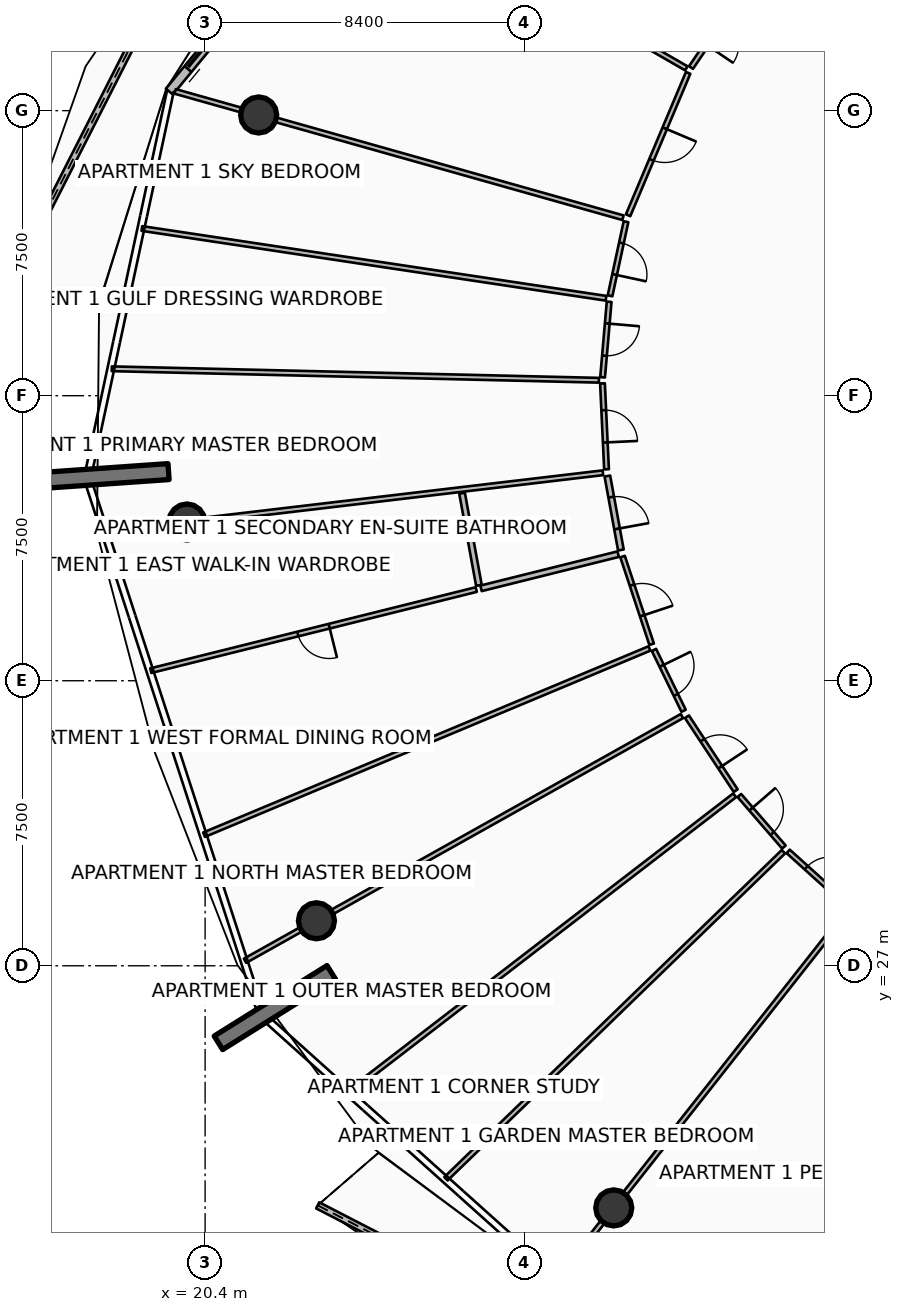
"""IFC4 building model, lengths in metres.
Left out: names, types, materials, properties, quantities, classifications, styles, units other than length and angle.
Written with IfcOpenShell. Run it as: python <this file> out.ifc"""

import sys

from ifc_helpers import new_model, si_unit, direction, frame, frame_2d, origin, origin_2d, place, context, subcontext, project, spatial, polyline, rectangle, circle, outline, extrude, element, fill, save


model = new_model("IFC4")
c1 = context("Model", 3, precision=1e-05, world=origin(), true_north=direction((0.0, 1.0)))
c2 = subcontext(c1, "Body", "Model", "MODEL_VIEW")
j1 = project(units=[si_unit("LENGTHUNIT", "METRE"), si_unit("PLANEANGLEUNIT", "RADIAN")], contexts=[c1])
p1 = place(None, origin())
s1 = spatial("IfcSite", under=j1, at=p1, CompositionType="ELEMENT")
p2 = place(p1, origin())
s2 = spatial("IfcBuilding", under=s1, at=p2, CompositionType="ELEMENT")
p3 = place(p2, frame((0.0, 0.0, 286.75)))
s3 = spatial("IfcBuildingStorey", under=s2, at=p3, CompositionType="ELEMENT", Elevation=286.75)
p4 = place(p3, frame((19.438, 40.003, 0.0), z_axis=(0.0, 0.0, 1.0), x_axis=(-0.997563824095, -0.069759707979, 0.0)))
e1 = element("IfcWall", 1, at=p4, inside=s3, PredefinedType="SOLIDWALL", context=c2, shape_type="SweptSolid", body=[
    extrude(rectangle(XDim=3.5, YDim=0.42, at=frame_2d((1.75, 0.0))), origin(), (0.0, 0.0, 1.0), 3.85),
])
p5 = place(p3, frame((23.719, 26.827, 0.0), z_axis=(0.0, 0.0, 1.0), x_axis=(-0.848033572426, -0.529942506352, 0.0)))
e2 = element("IfcWall", 2, at=p5, inside=s3, PredefinedType="SOLIDWALL", context=c2, shape_type="SweptSolid", body=[
    extrude(rectangle(XDim=3.5, YDim=0.42, at=frame_2d((1.75, 0.0))), origin(), (0.0, 0.0, 1.0), 3.85),
])
for number, where, z_axis, x_axis in (
    (3, (21.809, 49.387, 0.0), (0.0, 0.0, 1.0), (1.0, 0.0, 0.0)),
    (4, (19.92, 38.677, 0.0), (0.0, 0.0, 1.0), (1.0, 0.0, 0.0)),
    (5, (23.33, 28.184, 0.0), (0.0, 0.0, 1.0), (1.0, 0.0, 0.0)),
    (6, (31.153, 20.629, 0.0), (0.0, 0.0, 1.0), (1.0, 0.0, 0.0)),
):
    element("IfcColumn", number, at=place(p3, frame(where, z_axis=z_axis, x_axis=x_axis)), inside=s3, PredefinedType="COLUMN", context=c2, shape_type="SweptSolid", body=[
        extrude(circle(Radius=0.475, at=origin_2d()), origin(), (0.0, 0.0, 1.0), 3.59),
    ])
p6 = place(p3, frame((20.758, 55.746, 0.0), z_axis=(0.0, 0.0, 1.0), x_axis=(-0.45375182612, -0.891128094211, 0.0)))
e7 = element("IfcWall", 7, at=p6, inside=s3, PredefinedType="PARAPET", context=c2, shape_type="SweptSolid", body=[
    extrude(outline(polyline([(0.0, 0.0), (12.3, 0.0), (12.3, 1.747), (6.15, 1.562), (0.0, 1.348), (0.0, 0.0)])), frame((0.0, 0.09, 0.0), z_axis=(0.0, -1.0, 0.0), x_axis=(1.0, 0.0, 0.0)), (0.0, 0.0, 1.0), 0.18),
])
p7 = place(p3, frame((23.363, 20.696, 0.0), z_axis=(0.0, 0.0, 1.0), x_axis=(0.888586869338, -0.458708377556, 0.0)))
e8 = element("IfcWall", 8, at=p7, inside=s3, PredefinedType="PARAPET", context=c2, shape_type="SweptSolid", body=[
    extrude(outline(polyline([(0.0, 0.0), (12.16, 0.0), (12.16, 1.148), (6.08, 1.284), (0.0, 1.483), (0.0, 0.0)])), frame((0.0, 0.09, 0.0), z_axis=(0.0, -1.0, 0.0), x_axis=(1.0, 0.0, 0.0)), (0.0, 0.0, 1.0), 0.18),
])
p8 = place(p3, frame((26.742, 58.822, 0.0), z_axis=(0.0, 0.0, 1.0), x_axis=(-0.636680093065, -0.771128043255, 0.0)))
e9 = element("IfcWall", 9, at=p8, inside=s3, PredefinedType="SOLIDWALL", context=c2, shape_type="SweptSolid", body=[
    extrude(rectangle(XDim=11.438, YDim=0.24, at=frame_2d((5.719, 0.0))), origin(), (0.0, 0.0, 1.0), 2.54),
])
p9 = place(p8, frame((9.218, 0.0, 0.0)))
e10 = element("IfcOpeningElement", 10, at=p9, cuts=e9, PredefinedType="OPENING", context=c2, shape_type="SweptSolid", body=[
    extrude(rectangle(XDim=1.45, YDim=2.15, at=frame_2d((0.725, 1.075))), frame((0.0, 0.13, 0.0), z_axis=(0.0, -1.0, 0.0), x_axis=(1.0, 0.0, 0.0)), (0.0, 0.0, 1.0), 0.26),
])
p10 = place(p8, frame((0.28, 0.0, 0.65)))
e11 = element("IfcOpeningElement", 11, at=p10, cuts=e9, PredefinedType="OPENING", context=c2, shape_type="SweptSolid", body=[
    extrude(rectangle(XDim=1.6, YDim=1.5, at=frame_2d((0.8, 0.75))), frame((0.0, 0.13, 0.0), z_axis=(0.0, -1.0, 0.0), x_axis=(1.0, 0.0, 0.0)), (0.0, 0.0, 1.0), 0.26),
])
p11 = place(p3, frame((33.063, 50.613, 0.0), z_axis=(0.0, 0.0, 1.0), x_axis=(-0.866292819656, 0.499536535814, 0.0)))
e12 = element("IfcWall", 12, at=p11, inside=s3, PredefinedType="PARTITIONING", context=c2, shape_type="SweptSolid", body=[
    extrude(rectangle(XDim=10.118, YDim=0.125, at=frame_2d((5.059, 0.0))), origin(), (0.0, 0.0, 1.0), 3.03),
])
p12 = place(p3, frame((34.474, 52.536, 0.0), z_axis=(0.0, 0.0, 1.0), x_axis=(-0.560794078194, -0.827955313929, 0.0)))
e13 = element("IfcWall", 13, at=p12, inside=s3, PredefinedType="PARTITIONING", context=c2, shape_type="SweptSolid", body=[
    extrude(rectangle(XDim=2.296, YDim=0.125, at=frame_2d((1.148, 0.0))), origin(), (0.0, 0.0, 1.0), 2.957),
])
p13 = place(p12, frame((0.723, 0.0, 0.0)))
e14 = element("IfcOpeningElement", 14, at=p13, cuts=e13, PredefinedType="OPENING", context=c2, shape_type="SweptSolid", body=[
    extrude(rectangle(XDim=0.85, YDim=2.06, at=frame_2d((0.425, 1.03))), frame((0.0, 0.073, 0.0), z_axis=(0.0, -1.0, 0.0), x_axis=(1.0, 0.0, 0.0)), (0.0, 0.0, 1.0), 0.145),
])
p14 = place(p3, frame((33.11, 50.494, 0.0), z_axis=(0.0, 0.0, 1.0), x_axis=(-0.388491824698, -0.921452170296, 0.0)))
e15 = element("IfcWall", 15, at=p14, inside=s3, PredefinedType="PARTITIONING", context=c2, shape_type="SweptSolid", body=[
    extrude(rectangle(XDim=4.066, YDim=0.125, at=frame_2d((2.033, 0.0))), origin(), (0.0, 0.0, 1.0), 2.957),
])
p15 = place(p14, frame((1.583, 0.0, 0.0)))
e16 = element("IfcOpeningElement", 16, at=p15, cuts=e15, PredefinedType="OPENING", context=c2, shape_type="SweptSolid", body=[
    extrude(rectangle(XDim=0.9, YDim=2.08, at=frame_2d((0.45, 1.04))), frame((0.0, 0.073, 0.0), z_axis=(0.0, -1.0, 0.0), x_axis=(1.0, 0.0, 0.0)), (0.0, 0.0, 1.0), 0.145),
])
p16 = place(p3, frame((31.396, 46.683, 0.0), z_axis=(0.0, 0.0, 1.0), x_axis=(-0.962453683352, 0.271445956688, 0.0)))
e17 = element("IfcWall", 17, at=p16, inside=s3, PredefinedType="PARTITIONING", context=c2, shape_type="SweptSolid", body=[
    extrude(rectangle(XDim=12.244, YDim=0.125, at=frame_2d((6.122, 0.0))), origin(), (0.0, 0.0, 1.0), 2.957),
])
p17 = place(p3, frame((30.95, 44.563, 0.0), z_axis=(0.0, 0.0, 1.0), x_axis=(-0.988886709817, 0.148671029955, 0.0)))
e18 = element("IfcWall", 18, at=p17, inside=s3, PredefinedType="PARTITIONING", context=c2, shape_type="SweptSolid", body=[
    extrude(rectangle(XDim=12.351, YDim=0.125, at=frame_2d((6.175, 0.0))), origin(), (0.0, 0.0, 1.0), 3.03),
])
p18 = place(p3, frame((30.763, 42.406, 0.0), z_axis=(0.0, 0.0, 1.0), x_axis=(-0.99972256554, 0.023554021933, 0.0)))
e19 = element("IfcWall", 19, at=p18, inside=s3, PredefinedType="PARTITIONING", context=c2, shape_type="SweptSolid", body=[
    extrude(rectangle(XDim=12.822, YDim=0.125, at=frame_2d((6.411, 0.0))), origin(), (0.0, 0.0, 1.0), 3.03),
])
p19 = place(p3, frame((31.475, 46.577, 0.0), z_axis=(0.0, 0.0, 1.0), x_axis=(-0.210482265154, -0.977597675967, 0.0)))
e20 = element("IfcWall", 20, at=p19, inside=s3, PredefinedType="PARTITIONING", context=c2, shape_type="SweptSolid", body=[
    extrude(rectangle(XDim=1.994, YDim=0.125, at=frame_2d((0.997, 0.0))), origin(), (0.0, 0.0, 1.0), 2.957),
])
p20 = place(p19, frame((0.572, 0.0, 0.0)))
e21 = element("IfcOpeningElement", 21, at=p20, cuts=e20, PredefinedType="OPENING", context=c2, shape_type="SweptSolid", body=[
    extrude(rectangle(XDim=0.85, YDim=2.06, at=frame_2d((0.425, 1.03))), frame((0.0, 0.073, 0.0), z_axis=(0.0, -1.0, 0.0), x_axis=(1.0, 0.0, 0.0)), (0.0, 0.0, 1.0), 0.145),
])
p21 = place(p3, frame((31.032, 44.47, 0.0), z_axis=(0.0, 0.0, 1.0), x_axis=(-0.086328422667, -0.996266733079, 0.0)))
e22 = element("IfcWall", 22, at=p21, inside=s3, PredefinedType="PARTITIONING", context=c2, shape_type="SweptSolid", body=[
    extrude(rectangle(XDim=1.994, YDim=0.125, at=frame_2d((0.997, 0.0))), origin(), (0.0, 0.0, 1.0), 3.03),
])
p22 = place(p21, frame((0.572, 0.0, 0.0)))
e23 = element("IfcOpeningElement", 23, at=p22, cuts=e22, PredefinedType="OPENING", context=c2, shape_type="SweptSolid", body=[
    extrude(rectangle(XDim=0.85, YDim=2.06, at=frame_2d((0.425, 1.03))), frame((0.0, 0.073, 0.0), z_axis=(0.0, -1.0, 0.0), x_axis=(1.0, 0.0, 0.0)), (0.0, 0.0, 1.0), 0.145),
])
p23 = place(p3, frame((30.857, 42.324, 0.0), z_axis=(0.0, 0.0, 1.0), x_axis=(0.047042266611, -0.998892899741, 0.0)))
e24 = element("IfcWall", 24, at=p23, inside=s3, PredefinedType="PARTITIONING", context=c2, shape_type="SweptSolid", body=[
    extrude(rectangle(XDim=2.263, YDim=0.125, at=frame_2d((1.131, 0.0))), origin(), (0.0, 0.0, 1.0), 2.957),
])
p24 = place(p23, frame((0.706, 0.0, 0.0)))
e25 = element("IfcOpeningElement", 25, at=p24, cuts=e24, PredefinedType="OPENING", context=c2, shape_type="SweptSolid", body=[
    extrude(rectangle(XDim=0.85, YDim=2.06, at=frame_2d((0.425, 1.03))), frame((0.0, 0.073, 0.0), z_axis=(0.0, -1.0, 0.0), x_axis=(1.0, 0.0, 0.0)), (0.0, 0.0, 1.0), 0.145),
])
p25 = place(p3, frame((30.868, 39.972, 0.0), z_axis=(0.0, 0.0, 1.0), x_axis=(-0.993068921398, -0.117533473328, 0.0)))
e26 = element("IfcWall", 26, at=p25, inside=s3, PredefinedType="PARTITIONING", context=c2, shape_type="SweptSolid", body=[
    extrude(rectangle(XDim=13.178, YDim=0.125, at=frame_2d((6.589, 0.0))), origin(), (0.0, 0.0, 1.0), 2.957),
])
p26 = place(p3, frame((30.985, 39.885, 0.0), z_axis=(0.0, 0.0, 1.0), x_axis=(0.180015292758, -0.983663811662, 0.0)))
e27 = element("IfcWall", 27, at=p26, inside=s3, PredefinedType="PARTITIONING", context=c2, shape_type="SweptSolid", body=[
    extrude(rectangle(XDim=1.977, YDim=0.15, at=frame_2d((0.989, 0.0))), origin(), (0.0, 0.0, 1.0), 2.957),
])
p27 = place(p26, frame((0.564, 0.0, 0.0)))
e28 = element("IfcOpeningElement", 28, at=p27, cuts=e27, PredefinedType="OPENING", context=c2, shape_type="SweptSolid", body=[
    extrude(rectangle(XDim=0.85, YDim=2.06, at=frame_2d((0.425, 1.03))), frame((0.0, 0.085, 0.0), z_axis=(0.0, -1.0, 0.0), x_axis=(1.0, 0.0, 0.0)), (0.0, 0.0, 1.0), 0.17),
])
p28 = place(p3, frame((27.162, 39.433, 0.0), z_axis=(0.0, 0.0, 1.0), x_axis=(0.180045053774, -0.983658364785, 0.0)))
e29 = element("IfcWall", 29, at=p28, inside=s3, PredefinedType="PARTITIONING", context=c2, shape_type="SweptSolid", body=[
    extrude(rectangle(XDim=2.464, YDim=0.15, at=frame_2d((1.232, 0.0))), origin(), (0.0, 0.0, 1.0), 2.957),
])
p29 = place(p3, frame((31.27, 37.83, 0.0), z_axis=(0.0, 0.0, 1.0), x_axis=(-0.97033137229, -0.241778882348, 0.0)))
e30 = element("IfcWall", 30, at=p29, inside=s3, PredefinedType="PARTITIONING", context=c2, shape_type="SweptSolid", body=[
    extrude(rectangle(XDim=3.72, YDim=0.15, at=frame_2d((1.86, 0.0))), origin(), (0.0, 0.0, 1.0), 3.03),
])
p30 = place(p3, frame((27.534, 36.899, 0.0), z_axis=(0.0, 0.0, 1.0), x_axis=(-0.970319606555, -0.241826096887, 0.0)))
e31 = element("IfcWall", 31, at=p30, inside=s3, PredefinedType="PARTITIONING", context=c2, shape_type="SweptSolid", body=[
    extrude(rectangle(XDim=8.826, YDim=0.125, at=frame_2d((4.413, 0.0))), origin(), (0.0, 0.0, 1.0), 3.03),
])
p31 = place(p30, frame((3.988, 0.0, 0.0)))
e32 = element("IfcOpeningElement", 32, at=p31, cuts=e31, PredefinedType="OPENING", context=c2, shape_type="SweptSolid", body=[
    extrude(rectangle(XDim=0.85, YDim=2.06, at=frame_2d((0.425, 1.03))), frame((0.0, 0.073, 0.0), z_axis=(0.0, -1.0, 0.0), x_axis=(1.0, 0.0, 0.0)), (0.0, 0.0, 1.0), 0.145),
])
p32 = place(p3, frame((32.093, 35.349, 0.0), z_axis=(0.0, 0.0, 1.0), x_axis=(-0.922603134387, -0.385750510588, 0.0)))
e33 = element("IfcWall", 33, at=p32, inside=s3, PredefinedType="PARTITIONING", context=c2, shape_type="SweptSolid", body=[
    extrude(rectangle(XDim=12.703, YDim=0.125, at=frame_2d((6.352, 0.0))), origin(), (0.0, 0.0, 1.0), 3.03),
])
p33 = place(p3, frame((31.385, 37.767, 0.0), z_axis=(0.0, 0.0, 1.0), x_axis=(0.314690560305, -0.94919431691, 0.0)))
e34 = element("IfcWall", 34, at=p33, inside=s3, PredefinedType="PARTITIONING", context=c2, shape_type="SweptSolid", body=[
    extrude(rectangle(XDim=2.431, YDim=0.125, at=frame_2d((1.215, 0.0))), origin(), (0.0, 0.0, 1.0), 3.03),
])
p34 = place(p33, frame((0.79, 0.0, 0.0)))
e35 = element("IfcOpeningElement", 35, at=p34, cuts=e34, PredefinedType="OPENING", context=c2, shape_type="SweptSolid", body=[
    extrude(rectangle(XDim=0.85, YDim=2.06, at=frame_2d((0.425, 1.03))), frame((0.0, 0.073, 0.0), z_axis=(0.0, -1.0, 0.0), x_axis=(1.0, 0.0, 0.0)), (0.0, 0.0, 1.0), 0.145),
])
p35 = place(p3, frame((32.21, 35.312, 0.0), z_axis=(0.0, 0.0, 1.0), x_axis=(0.437932532195, -0.899007840481, 0.0)))
e36 = element("IfcWall", 36, at=p35, inside=s3, PredefinedType="PARTITIONING", context=c2, shape_type="SweptSolid", body=[
    extrude(rectangle(XDim=1.783, YDim=0.125, at=frame_2d((0.891, 0.0))), origin(), (0.0, 0.0, 1.0), 2.957),
])
p36 = place(p35, frame((0.466, 0.0, 0.0)))
e37 = element("IfcOpeningElement", 37, at=p36, cuts=e36, PredefinedType="OPENING", context=c2, shape_type="SweptSolid", body=[
    extrude(rectangle(XDim=0.85, YDim=2.06, at=frame_2d((0.425, 1.03))), frame((0.0, 0.073, 0.0), z_axis=(0.0, -1.0, 0.0), x_axis=(1.0, 0.0, 0.0)), (0.0, 0.0, 1.0), 0.145),
])
p37 = place(p3, frame((32.948, 33.57, 0.0), z_axis=(0.0, 0.0, 1.0), x_axis=(-0.872495274329, -0.488622549903, 0.0)))
e38 = element("IfcWall", 38, at=p37, inside=s3, PredefinedType="PARTITIONING", context=c2, shape_type="SweptSolid", body=[
    extrude(rectangle(XDim=13.178, YDim=0.125, at=frame_2d((6.589, 0.0))), origin(), (0.0, 0.0, 1.0), 2.957),
])
p38 = place(p3, frame((37.319, 28.452, 0.0), z_axis=(0.0, 0.0, 1.0), x_axis=(-0.619095191857, -0.785315951334, 0.0)))
e39 = element("IfcWall", 39, at=p38, inside=s3, PredefinedType="PARTITIONING", context=c2, shape_type="SweptSolid", body=[
    extrude(rectangle(XDim=12.344, YDim=0.125, at=frame_2d((6.172, 0.0))), origin(), (0.0, 0.0, 1.0), 2.957),
])
p39 = place(p3, frame((34.335, 31.486, 0.0), z_axis=(0.0, 0.0, 1.0), x_axis=(-0.792560168622, -0.609793718493, 0.0)))
e40 = element("IfcWall", 40, at=p39, inside=s3, PredefinedType="PARTITIONING", context=c2, shape_type="SweptSolid", body=[
    extrude(rectangle(XDim=12.8, YDim=0.125, at=frame_2d((6.4, 0.0))), origin(), (0.0, 0.0, 1.0), 3.03),
])
p40 = place(p3, frame((35.618, 30.001, 0.0), z_axis=(0.0, 0.0, 1.0), x_axis=(-0.718124899013, -0.695914239988, 0.0)))
e41 = element("IfcWall", 41, at=p40, inside=s3, PredefinedType="PARTITIONING", context=c2, shape_type="SweptSolid", body=[
    extrude(rectangle(XDim=12.366, YDim=0.125, at=frame_2d((6.183, 0.0))), origin(), (0.0, 0.0, 1.0), 3.03),
])
p41 = place(p3, frame((33.079, 33.552, 0.0), z_axis=(0.0, 0.0, 1.0), x_axis=(0.550607173666, -0.83476448194, 0.0)))
e42 = element("IfcWall", 42, at=p41, inside=s3, PredefinedType="PARTITIONING", context=c2, shape_type="SweptSolid", body=[
    extrude(rectangle(XDim=2.33, YDim=0.125, at=frame_2d((1.165, 0.0))), origin(), (0.0, 0.0, 1.0), 2.957),
])
p42 = place(p41, frame((0.74, 0.0, 0.0)))
e43 = element("IfcOpeningElement", 43, at=p42, cuts=e42, PredefinedType="OPENING", context=c2, shape_type="SweptSolid", body=[
    extrude(rectangle(XDim=0.85, YDim=2.06, at=frame_2d((0.425, 1.03))), frame((0.0, 0.073, 0.0), z_axis=(0.0, -1.0, 0.0), x_axis=(1.0, 0.0, 0.0)), (0.0, 0.0, 1.0), 0.145),
])
p43 = place(p3, frame((34.458, 31.48, 0.0), z_axis=(0.0, 0.0, 1.0), x_axis=(0.653882286754, -0.756596295966, 0.0)))
e44 = element("IfcWall", 44, at=p43, inside=s3, PredefinedType="PARTITIONING", context=c2, shape_type="SweptSolid", body=[
    extrude(rectangle(XDim=1.792, YDim=0.125, at=frame_2d((0.896, 0.0))), origin(), (0.0, 0.0, 1.0), 3.03),
])
p44 = place(p43, frame((0.471, 0.0, 0.0)))
e45 = element("IfcOpeningElement", 45, at=p44, cuts=e44, PredefinedType="OPENING", context=c2, shape_type="SweptSolid", body=[
    extrude(rectangle(XDim=0.85, YDim=2.06, at=frame_2d((0.425, 1.03))), frame((0.0, 0.073, 0.0), z_axis=(0.0, -1.0, 0.0), x_axis=(1.0, 0.0, 0.0)), (0.0, 0.0, 1.0), 0.145),
])
p45 = place(p3, frame((35.742, 30.01, 0.0), z_axis=(0.0, 0.0, 1.0), x_axis=(0.742260909421, -0.670110992557, 0.0)))
e46 = element("IfcWall", 46, at=p45, inside=s3, PredefinedType="PARTITIONING", context=c2, shape_type="SweptSolid", body=[
    extrude(rectangle(XDim=2.128, YDim=0.125, at=frame_2d((1.064, 0.0))), origin(), (0.0, 0.0, 1.0), 2.957),
])
p46 = place(p45, frame((0.639, 0.0, 0.0)))
e47 = element("IfcOpeningElement", 47, at=p46, cuts=e46, PredefinedType="OPENING", context=c2, shape_type="SweptSolid", body=[
    extrude(rectangle(XDim=0.85, YDim=2.06, at=frame_2d((0.425, 1.03))), frame((0.0, 0.073, 0.0), z_axis=(0.0, -1.0, 0.0), x_axis=(1.0, 0.0, 0.0)), (0.0, 0.0, 1.0), 0.145),
])
p47 = place(p9, origin())
e48 = element("IfcDoor", 48, at=p47, inside=s3, OperationType="DOUBLE_DOOR_SLIDING", PredefinedType="DOOR", context=c2, shape_type="SweptSolid", body=[
    extrude(rectangle(XDim=1.45, YDim=2.15, at=frame_2d((0.725, 1.075))), frame((0.0, 0.025, 0.0), z_axis=(0.0, -1.0, 0.0), x_axis=(1.0, 0.0, 0.0)), (0.0, 0.0, 1.0), 0.05),
])
fill(e10, e48)
p48 = place(p15, origin())
e49 = element("IfcDoor", 49, at=p48, inside=s3, OperationType="SINGLE_SWING_LEFT", PredefinedType="DOOR", context=c2, shape_type="SweptSolid", body=[
    extrude(rectangle(XDim=0.9, YDim=2.08, at=frame_2d((0.45, 1.04))), frame((0.0, 0.025, 0.0), z_axis=(0.0, -1.0, 0.0), x_axis=(1.0, 0.0, 0.0)), (0.0, 0.0, 1.0), 0.05),
])
fill(e16, e49)
p49 = place(p20, origin())
e50 = element("IfcDoor", 50, at=p49, inside=s3, OperationType="SINGLE_SWING_RIGHT", PredefinedType="DOOR", context=c2, shape_type="SweptSolid", body=[
    extrude(rectangle(XDim=0.85, YDim=2.06, at=frame_2d((0.425, 1.03))), frame((0.0, 0.025, 0.0), z_axis=(0.0, -1.0, 0.0), x_axis=(1.0, 0.0, 0.0)), (0.0, 0.0, 1.0), 0.05),
])
fill(e21, e50)
p50 = place(p22, origin())
e51 = element("IfcDoor", 51, at=p50, inside=s3, OperationType="SINGLE_SWING_LEFT", PredefinedType="DOOR", context=c2, shape_type="SweptSolid", body=[
    extrude(rectangle(XDim=0.85, YDim=2.06, at=frame_2d((0.425, 1.03))), frame((0.0, 0.025, 0.0), z_axis=(0.0, -1.0, 0.0), x_axis=(1.0, 0.0, 0.0)), (0.0, 0.0, 1.0), 0.05),
])
fill(e23, e51)
p51 = place(p24, origin())
e52 = element("IfcDoor", 52, at=p51, inside=s3, OperationType="SINGLE_SWING_RIGHT", PredefinedType="DOOR", context=c2, shape_type="SweptSolid", body=[
    extrude(rectangle(XDim=0.85, YDim=2.06, at=frame_2d((0.425, 1.03))), frame((0.0, 0.025, 0.0), z_axis=(0.0, -1.0, 0.0), x_axis=(1.0, 0.0, 0.0)), (0.0, 0.0, 1.0), 0.05),
])
fill(e25, e52)
p52 = place(p27, origin())
e53 = element("IfcDoor", 53, at=p52, inside=s3, OperationType="SINGLE_SWING_RIGHT", PredefinedType="DOOR", context=c2, shape_type="SweptSolid", body=[
    extrude(rectangle(XDim=0.85, YDim=2.06, at=frame_2d((0.425, 1.03))), frame((0.0, 0.025, 0.0), z_axis=(0.0, -1.0, 0.0), x_axis=(1.0, 0.0, 0.0)), (0.0, 0.0, 1.0), 0.05),
])
fill(e28, e53)
p53 = place(p31, origin())
e54 = element("IfcDoor", 54, at=p53, inside=s3, OperationType="SINGLE_SWING_LEFT", PredefinedType="DOOR", context=c2, shape_type="SweptSolid", body=[
    extrude(rectangle(XDim=0.85, YDim=2.06, at=frame_2d((0.425, 1.03))), frame((0.0, 0.025, 0.0), z_axis=(0.0, -1.0, 0.0), x_axis=(1.0, 0.0, 0.0)), (0.0, 0.0, 1.0), 0.05),
])
fill(e32, e54)
p54 = place(p34, origin())
e55 = element("IfcDoor", 55, at=p54, inside=s3, OperationType="SINGLE_SWING_RIGHT", PredefinedType="DOOR", context=c2, shape_type="SweptSolid", body=[
    extrude(rectangle(XDim=0.85, YDim=2.06, at=frame_2d((0.425, 1.03))), frame((0.0, 0.025, 0.0), z_axis=(0.0, -1.0, 0.0), x_axis=(1.0, 0.0, 0.0)), (0.0, 0.0, 1.0), 0.05),
])
fill(e35, e55)
p55 = place(p36, origin())
e56 = element("IfcDoor", 56, at=p55, inside=s3, OperationType="SINGLE_SWING_LEFT", PredefinedType="DOOR", context=c2, shape_type="SweptSolid", body=[
    extrude(rectangle(XDim=0.85, YDim=2.06, at=frame_2d((0.425, 1.03))), frame((0.0, 0.025, 0.0), z_axis=(0.0, -1.0, 0.0), x_axis=(1.0, 0.0, 0.0)), (0.0, 0.0, 1.0), 0.05),
])
fill(e37, e56)
p56 = place(p42, origin())
e57 = element("IfcDoor", 57, at=p56, inside=s3, OperationType="SINGLE_SWING_RIGHT", PredefinedType="DOOR", context=c2, shape_type="SweptSolid", body=[
    extrude(rectangle(XDim=0.85, YDim=2.06, at=frame_2d((0.425, 1.03))), frame((0.0, 0.025, 0.0), z_axis=(0.0, -1.0, 0.0), x_axis=(1.0, 0.0, 0.0)), (0.0, 0.0, 1.0), 0.05),
])
fill(e43, e57)
p57 = place(p44, origin())
e58 = element("IfcDoor", 58, at=p57, inside=s3, OperationType="SINGLE_SWING_LEFT", PredefinedType="DOOR", context=c2, shape_type="SweptSolid", body=[
    extrude(rectangle(XDim=0.85, YDim=2.06, at=frame_2d((0.425, 1.03))), frame((0.0, 0.025, 0.0), z_axis=(0.0, -1.0, 0.0), x_axis=(1.0, 0.0, 0.0)), (0.0, 0.0, 1.0), 0.05),
])
fill(e45, e58)
p58 = place(p46, origin())
e59 = element("IfcDoor", 59, at=p58, inside=s3, OperationType="SINGLE_SWING_RIGHT", PredefinedType="DOOR", context=c2, shape_type="SweptSolid", body=[
    extrude(rectangle(XDim=0.85, YDim=2.06, at=frame_2d((0.425, 1.03))), frame((0.0, 0.025, 0.0), z_axis=(0.0, -1.0, 0.0), x_axis=(1.0, 0.0, 0.0)), (0.0, 0.0, 1.0), 0.05),
])
fill(e47, e59)
save(model, sys.argv[1])
